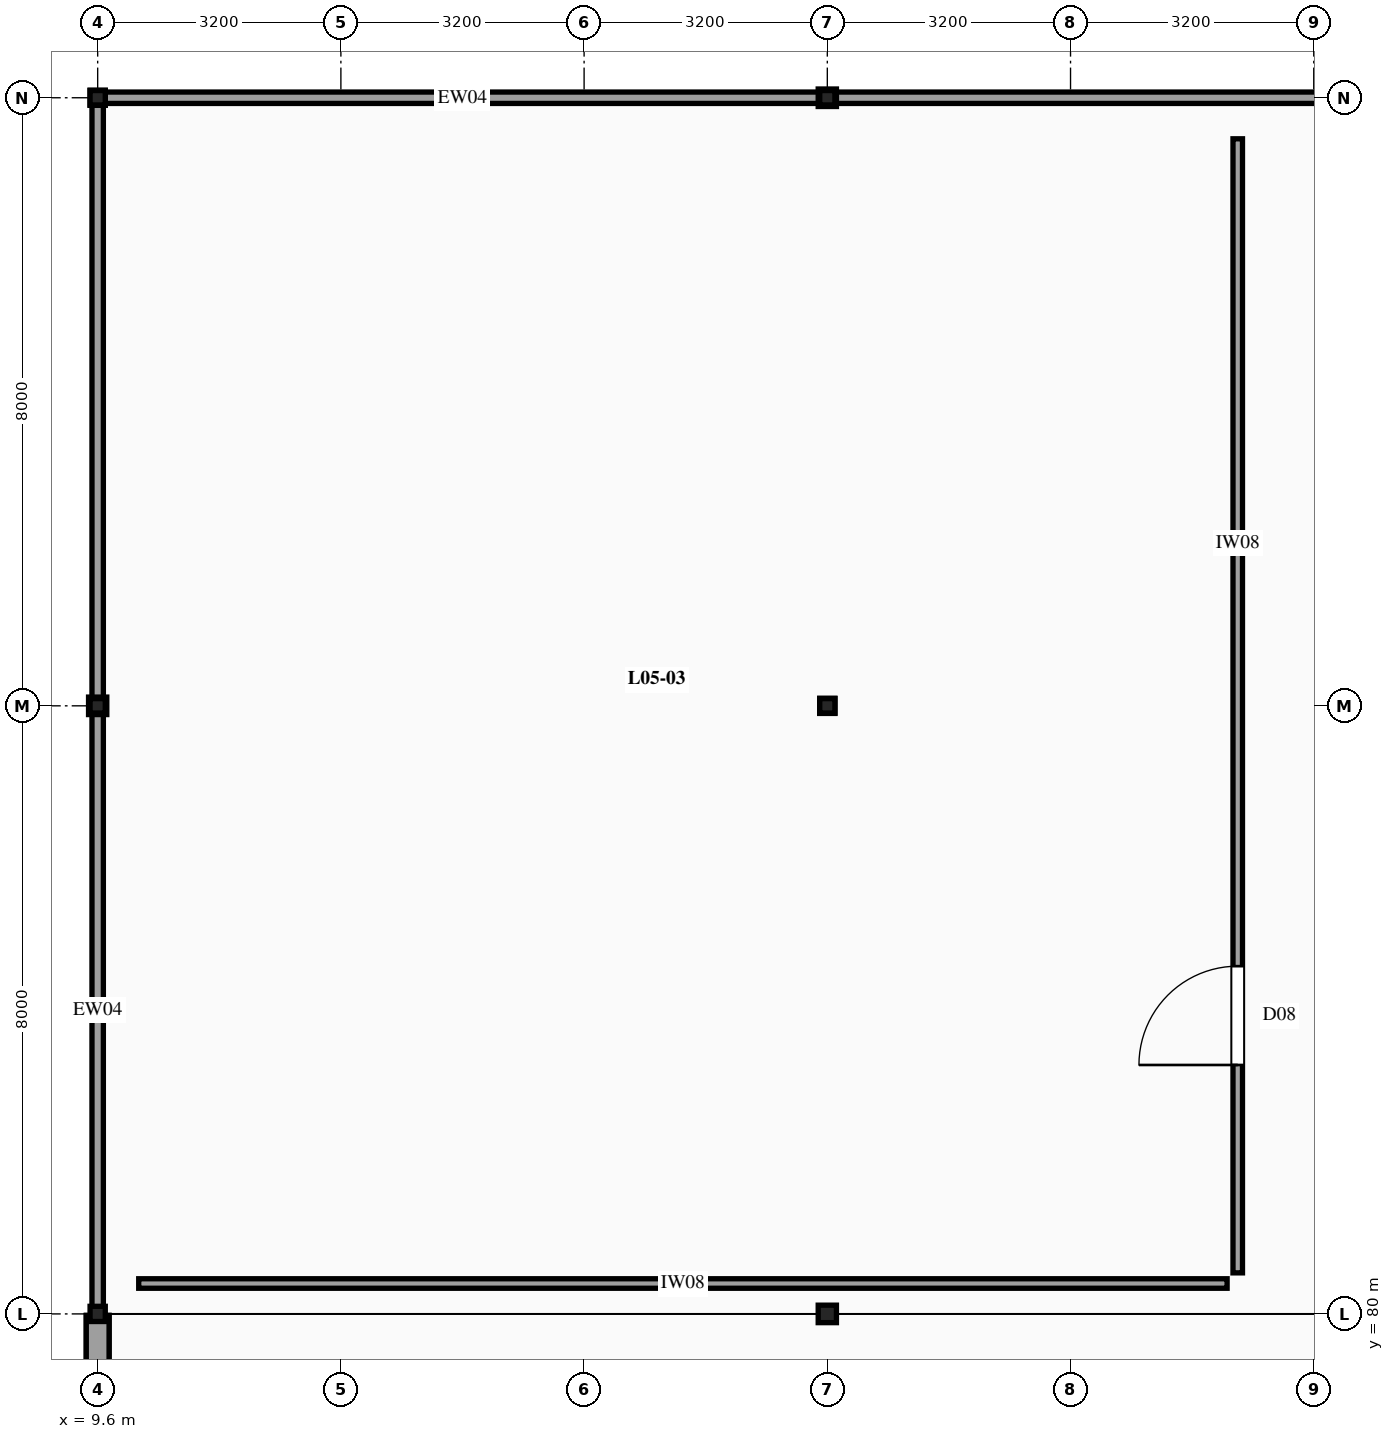
"""IFC4 building model, lengths in metres.
Left out: names, types, materials, properties, quantities, classifications, styles, units other than length and angle.
Written with IfcOpenShell. Run it as: python <this file> out.ifc"""

import sys

from ifc_helpers import new_model, si_unit, direction, frame, frame_2d, origin, origin_2d, place, context, subcontext, project, spatial, rectangle, i_section, extrude, element, fill, save


model = new_model("IFC4")
c1 = context("Model", 3, precision=1e-05, world=origin(), true_north=direction((0.0, 1.0)))
c2 = subcontext(c1, "Body", "Model", "MODEL_VIEW")
j1 = project(units=[si_unit("LENGTHUNIT", "METRE"), si_unit("PLANEANGLEUNIT", "RADIAN")], contexts=[c1])
p1 = place(None, origin())
s1 = spatial("IfcSite", under=j1, at=p1, CompositionType="ELEMENT")
p2 = place(p1, origin())
s2 = spatial("IfcBuilding", under=s1, at=p2, CompositionType="ELEMENT")
p3 = place(p2, frame((0.0, 0.0, 25.8)))
s3 = spatial("IfcBuildingStorey", under=s2, at=p3, CompositionType="ELEMENT", Elevation=25.8)
p4 = place(p3, frame((9.6, 80.0, -0.26), z_axis=(0.0, 0.0, 1.0), x_axis=(1.0, 0.0, 0.0)))
e1 = element("IfcColumn", 1, at=p4, inside=s3, PredefinedType="COLUMN", context=c2, shape_type="SweptSolid", body=[
    extrude(i_section(OverallWidth=0.2, OverallDepth=0.2, WebThickness=0.009, FlangeThickness=0.015, FilletRadius=0.018, at=origin_2d()), origin(), (0.0, 0.0, 1.0), 3.11),
])
p5 = place(p3, frame((9.6, 88.0, -0.26), z_axis=(0.0, 0.0, 1.0), x_axis=(1.0, 0.0, 0.0)))
e2 = element("IfcColumn", 2, at=p5, inside=s3, PredefinedType="COLUMN", context=c2, shape_type="SweptSolid", body=[
    extrude(i_section(OverallWidth=0.24, OverallDepth=0.23, WebThickness=0.008, FlangeThickness=0.012, FilletRadius=0.021, at=origin_2d()), origin(), (0.0, 0.0, 1.0), 3.11),
])
p6 = place(p3, frame((9.6, 96.0, -0.26), z_axis=(0.0, 0.0, 1.0), x_axis=(1.0, 0.0, 0.0)))
e3 = element("IfcColumn", 3, at=p6, inside=s3, PredefinedType="COLUMN", context=c2, shape_type="SweptSolid", body=[
    extrude(i_section(OverallWidth=0.2, OverallDepth=0.2, WebThickness=0.009, FlangeThickness=0.015, FilletRadius=0.018, at=origin_2d()), origin(), (0.0, 0.0, 1.0), 3.11),
])
p7 = place(p3, frame((19.2, 80.0, -0.26), z_axis=(0.0, 0.0, 1.0), x_axis=(1.0, 0.0, 0.0)))
e4 = element("IfcColumn", 4, at=p7, inside=s3, PredefinedType="COLUMN", context=c2, shape_type="SweptSolid", body=[
    extrude(i_section(OverallWidth=0.24, OverallDepth=0.23, WebThickness=0.008, FlangeThickness=0.012, FilletRadius=0.021, at=origin_2d()), origin(), (0.0, 0.0, 1.0), 3.11),
])
p8 = place(p3, frame((19.2, 88.0, -0.26), z_axis=(0.0, 0.0, 1.0), x_axis=(1.0, 0.0, 0.0)))
e5 = element("IfcColumn", 5, at=p8, inside=s3, PredefinedType="COLUMN", context=c2, shape_type="SweptSolid", body=[
    extrude(i_section(OverallWidth=0.2, OverallDepth=0.2, WebThickness=0.009, FlangeThickness=0.015, FilletRadius=0.018, at=origin_2d()), origin(), (0.0, 0.0, 1.0), 3.11),
])
p9 = place(p3, frame((19.2, 96.0, -0.26), z_axis=(0.0, 0.0, 1.0), x_axis=(1.0, 0.0, 0.0)))
e6 = element("IfcColumn", 6, at=p9, inside=s3, PredefinedType="COLUMN", context=c2, shape_type="SweptSolid", body=[
    extrude(i_section(OverallWidth=0.24, OverallDepth=0.23, WebThickness=0.008, FlangeThickness=0.012, FilletRadius=0.021, at=origin_2d()), origin(), (0.0, 0.0, 1.0), 3.11),
])
p10 = place(p3, frame((9.6, 88.0, 2.85), z_axis=(0.0, 0.0, 1.0), x_axis=(1.0, 0.0, 0.0)))
e7 = element("IfcColumn", 7, at=p10, inside=s3, PredefinedType="COLUMN", context=c2, shape_type="SweptSolid", body=[
    extrude(i_section(OverallWidth=0.2, OverallDepth=0.19, WebThickness=0.007, FlangeThickness=0.01, FilletRadius=0.018, at=origin_2d()), origin(), (0.0, 0.0, 1.0), 0.9),
])
p11 = place(p3, frame((9.6, 96.0, 2.85), z_axis=(0.0, 0.0, 1.0), x_axis=(1.0, 0.0, 0.0)))
e8 = element("IfcColumn", 8, at=p11, inside=s3, PredefinedType="COLUMN", context=c2, shape_type="SweptSolid", body=[
    extrude(i_section(OverallWidth=0.2, OverallDepth=0.19, WebThickness=0.007, FlangeThickness=0.01, FilletRadius=0.018, at=origin_2d()), origin(), (0.0, 0.0, 1.0), 2.05),
])
p12 = place(p3, frame((19.2, 88.0, 2.85), z_axis=(0.0, 0.0, 1.0), x_axis=(1.0, 0.0, 0.0)))
e9 = element("IfcColumn", 9, at=p12, inside=s3, PredefinedType="COLUMN", context=c2, shape_type="SweptSolid", body=[
    extrude(i_section(OverallWidth=0.2, OverallDepth=0.19, WebThickness=0.007, FlangeThickness=0.01, FilletRadius=0.018, at=origin_2d()), origin(), (0.0, 0.0, 1.0), 0.9),
])
p13 = place(p3, frame((19.2, 96.0, 2.85), z_axis=(0.0, 0.0, 1.0), x_axis=(1.0, 0.0, 0.0)))
e10 = element("IfcColumn", 10, at=p13, inside=s3, PredefinedType="COLUMN", context=c2, shape_type="SweptSolid", body=[
    extrude(i_section(OverallWidth=0.2, OverallDepth=0.19, WebThickness=0.007, FlangeThickness=0.01, FilletRadius=0.018, at=origin_2d()), origin(), (0.0, 0.0, 1.0), 2.05),
])
p14 = place(p3, frame((9.6, 72.02, 0.0), z_axis=(0.0, 0.0, 1.0), x_axis=(0.0, 1.0, 0.0)))
e11 = element("IfcWall", 11, at=p14, inside=s3, PredefinedType="SOLIDWALL", context=c2, shape_type="SweptSolid", body=[
    extrude(rectangle(XDim=7.96, YDim=0.3, at=frame_2d((3.98, 0.0))), origin(), (0.0, 0.0, 1.0), 2.8),
])
p15 = place(p3, frame((9.6, 72.02, 2.8), z_axis=(0.0, 0.0, 1.0), x_axis=(0.0, 1.0, 0.0)))
e12 = element("IfcWall", 12, at=p15, inside=s3, PredefinedType="SOLIDWALL", context=c2, shape_type="SweptSolid", body=[
    extrude(rectangle(XDim=7.96, YDim=0.3, at=frame_2d((3.98, 0.0))), origin(), (0.0, 0.0, 1.0), 1.65),
])
p16 = place(p3, frame((9.62, 96.0, 0.0), z_axis=(0.0, 0.0, 1.0), x_axis=(1.0, 0.0, 0.0)))
e13 = element("IfcWall", 13, at=p16, inside=s3, PredefinedType="SOLIDWALL", context=c2, shape_type="SweptSolid", body=[
    extrude(rectangle(XDim=9.56, YDim=0.15, at=frame_2d((4.78, 0.0))), origin(), (0.0, 0.0, 1.0), 2.45),
])
p17 = place(p3, frame((19.22, 96.0, 0.0), z_axis=(0.0, 0.0, 1.0), x_axis=(1.0, 0.0, 0.0)))
e14 = element("IfcWall", 14, at=p17, inside=s3, PredefinedType="SOLIDWALL", context=c2, shape_type="SweptSolid", body=[
    extrude(rectangle(XDim=9.56, YDim=0.15, at=frame_2d((4.78, 0.0))), origin(), (0.0, 0.0, 1.0), 2.45),
])
for number, where, z_axis, x_axis in (
    (15, (9.6, 80.02, 0.0), (0.0, 0.0, 1.0), (0.0, 1.0, 0.0)),
    (16, (9.6, 88.02, 0.0), (0.0, 0.0, 1.0), (0.0, 1.0, 0.0)),
):
    element("IfcWall", number, at=place(p3, frame(where, z_axis=z_axis, x_axis=x_axis)), inside=s3, PredefinedType="SOLIDWALL", context=c2, shape_type="SweptSolid", body=[
        extrude(rectangle(XDim=7.96, YDim=0.15, at=frame_2d((3.98, 0.0))), origin(), (0.0, 0.0, 1.0), 2.45),
    ])
p18 = place(p3, frame((10.14, 80.4, 0.0), z_axis=(0.0, 0.0, 1.0), x_axis=(1.0, 0.0, 0.0)))
e17 = element("IfcWall", 17, at=p18, inside=s3, PredefinedType="PARTITIONING", context=c2, shape_type="SweptSolid", body=[
    extrude(rectangle(XDim=14.32, YDim=0.125, at=frame_2d((7.16, 0.0))), origin(), (0.0, 0.0, 1.0), 2.35),
])
p19 = place(p3, frame((24.6, 80.54, 0.0), z_axis=(0.0, 0.0, 1.0), x_axis=(0.0, 1.0, 0.0)))
e18 = element("IfcWall", 18, at=p19, inside=s3, PredefinedType="PARTITIONING", context=c2, shape_type="SweptSolid", body=[
    extrude(rectangle(XDim=14.92, YDim=0.125, at=frame_2d((7.46, 0.0))), origin(), (0.0, 0.0, 1.0), 2.35),
])
p20 = place(p19, frame((2.735, 0.0, 0.0)))
e19 = element("IfcOpeningElement", 19, at=p20, cuts=e18, PredefinedType="OPENING", context=c2, shape_type="SweptSolid", body=[
    extrude(rectangle(XDim=1.3, YDim=2.25, at=frame_2d((0.65, 1.125))), frame((0.0, 0.073, 0.0), z_axis=(0.0, -1.0, 0.0), x_axis=(1.0, 0.0, 0.0)), (0.0, 0.0, 1.0), 0.145),
])
p21 = place(p20, origin())
e20 = element("IfcDoor", 20, at=p21, inside=s3, OperationType="SINGLE_SWING_LEFT", PredefinedType="DOOR", context=c2, shape_type="SweptSolid", body=[
    extrude(rectangle(XDim=1.3, YDim=2.25, at=frame_2d((0.65, 1.125))), frame((0.0, 0.025, 0.0), z_axis=(0.0, -1.0, 0.0), x_axis=(1.0, 0.0, 0.0)), (0.0, 0.0, 1.0), 0.05),
])
fill(e19, e20)
save(model, sys.argv[1])
